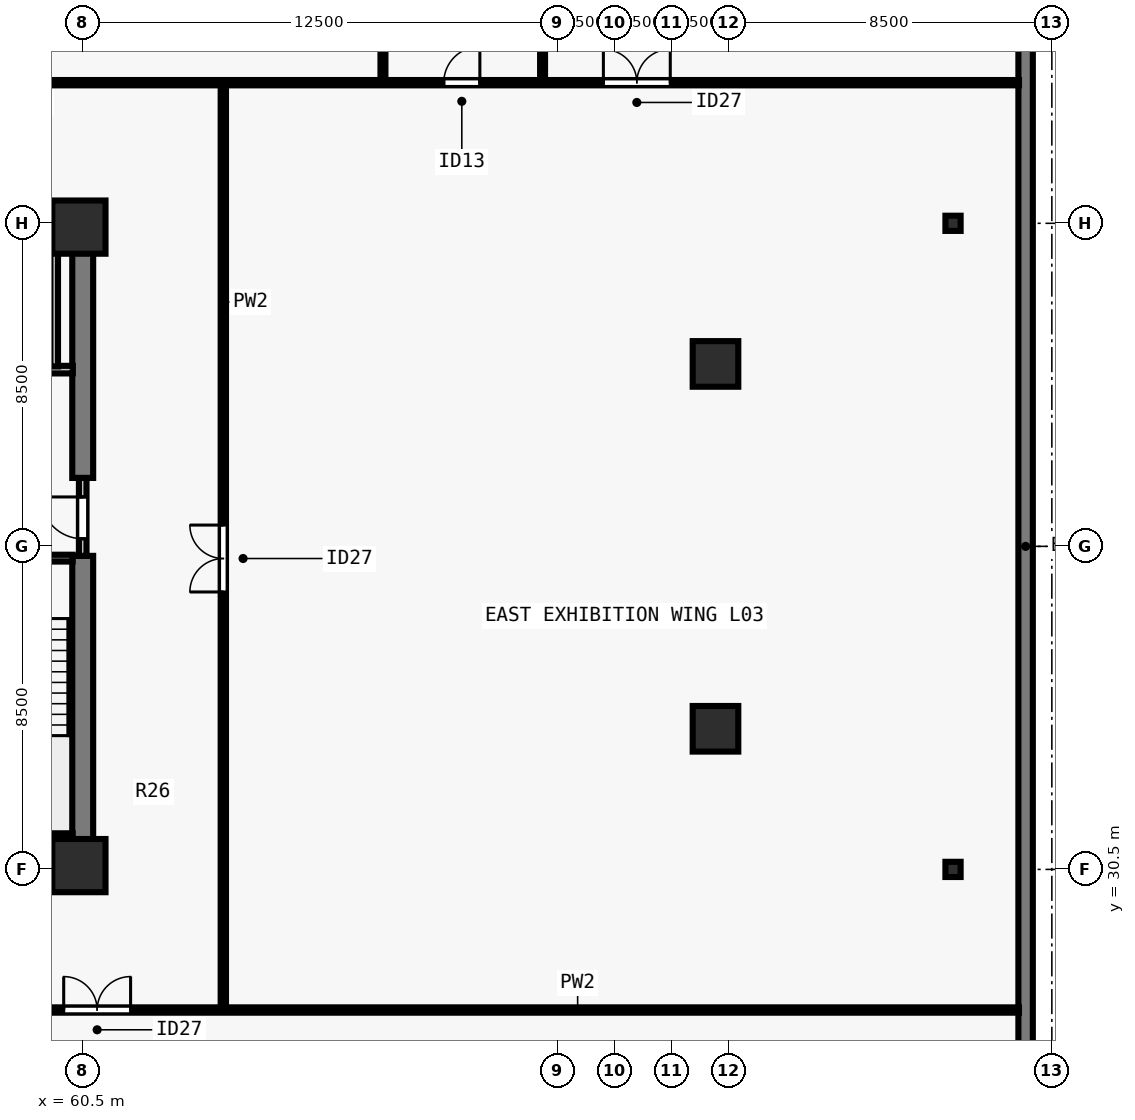
"""IFC4 building model, lengths in metres.
Left out: names, types, materials, properties, quantities, classifications, styles, units other than length and angle.
Written with IfcOpenShell. Run it as: python <this file> out.ifc"""

import sys

from ifc_helpers import new_model, si_unit, direction, frame, frame_2d, origin, origin_2d, place, context, subcontext, project, spatial, rectangle, i_section, extrude, element, fill, save


model = new_model("IFC4")
c1 = context("Model", 3, precision=1e-05, world=origin(), true_north=direction((0.0, 1.0)))
c2 = subcontext(c1, "Body", "Model", "MODEL_VIEW")
j1 = project(units=[si_unit("LENGTHUNIT", "METRE"), si_unit("PLANEANGLEUNIT", "RADIAN")], contexts=[c1])
p1 = place(None, origin())
s1 = spatial("IfcSite", under=j1, at=p1, CompositionType="ELEMENT")
p2 = place(p1, origin())
s2 = spatial("IfcBuilding", under=s1, at=p2, CompositionType="ELEMENT")
p3 = place(p2, frame((0.0, 0.0, 14.5)))
s3 = spatial("IfcBuildingStorey", under=s2, at=p3, CompositionType="ELEMENT", Elevation=14.5)
for number, where, z_axis, x_axis in (
    (1, (60.4, 30.6, 0.0), (0.0, 0.0, 1.0), (1.0, 0.0, 0.0)),
    (2, (60.4, 47.4, 0.0), (0.0, 0.0, 1.0), (1.0, 0.0, 0.0)),
):
    element("IfcColumn", number, at=place(p3, frame(where, z_axis=z_axis, x_axis=x_axis)), inside=s3, PredefinedType="COLUMN", context=c2, shape_type="SweptSolid", body=[
        extrude(rectangle(XDim=1.4, YDim=1.4, at=origin_2d()), origin(), (0.0, 0.0, 1.0), 4.5),
    ])
for number, where, z_axis, x_axis in (
    (3, (77.15, 34.2, 0.0), (0.0, 0.0, 1.0), (1.0, 0.0, 0.0)),
    (4, (77.15, 43.8, 0.0), (0.0, 0.0, 1.0), (1.0, 0.0, 0.0)),
):
    element("IfcColumn", number, at=place(p3, frame(where, z_axis=z_axis, x_axis=x_axis)), inside=s3, PredefinedType="COLUMN", context=c2, shape_type="SweptSolid", body=[
        extrude(rectangle(XDim=1.2, YDim=1.2, at=origin_2d()), origin(), (0.0, 0.0, 1.0), 4.5),
    ])
for number, where, z_axis, x_axis in (
    (5, (83.4, 30.5, 0.0), (0.0, 0.0, 1.0), (1.0, 0.0, 0.0)),
    (6, (83.4, 47.5, 0.0), (0.0, 0.0, 1.0), (1.0, 0.0, 0.0)),
):
    element("IfcColumn", number, at=place(p3, frame(where, z_axis=z_axis, x_axis=x_axis)), inside=s3, PredefinedType="COLUMN", context=c2, shape_type="SweptSolid", body=[
        extrude(i_section(OverallWidth=0.4, OverallDepth=0.4, WebThickness=0.028, FlangeThickness=0.045, at=origin_2d()), origin(), (0.0, 0.0, 1.0), 4.5),
    ])
p4 = place(p3, frame((85.31, 65.635, 0.0), z_axis=(0.0, 0.0, 1.0), x_axis=(0.0, -1.0, 0.0)))
e7 = element("IfcWall", 7, at=p4, inside=s3, PredefinedType="SOLIDWALL", context=c2, shape_type="SweptSolid", body=[
    extrude(rectangle(XDim=53.27, YDim=0.38, at=frame_2d((26.635, 0.0))), origin(), (0.0, 0.0, 1.0), 4.15),
])
for number, where, z_axis, x_axis in (
    (8, (43.225, 30.5, 0.0), (0.0, 0.0, 1.0), (1.0, 0.0, 0.0)),
    (9, (43.225, 47.5, 0.0), (0.0, 0.0, 1.0), (1.0, 0.0, 0.0)),
):
    element("IfcWall", number, at=place(p3, frame(where, z_axis=z_axis, x_axis=x_axis)), inside=s3, PredefinedType="SHEAR", context=c2, shape_type="SweptSolid", body=[
        extrude(rectangle(XDim=17.55, YDim=0.55, at=frame_2d((8.775, 0.0))), origin(), (0.0, 0.0, 1.0), 4.15),
    ])
p5 = place(p3, frame((60.5, 30.765, 0.0), z_axis=(0.0, 0.0, 1.0), x_axis=(0.0, 1.0, 0.0)))
e10 = element("IfcWall", 10, at=p5, inside=s3, PredefinedType="SHEAR", context=c2, shape_type="SweptSolid", body=[
    extrude(rectangle(XDim=7.985, YDim=0.55, at=frame_2d((3.993, 0.0))), origin(), (0.0, 0.0, 1.0), 4.15),
])
p6 = place(p3, frame((60.5, 40.8, 0.0), z_axis=(0.0, 0.0, 1.0), x_axis=(0.0, 1.0, 0.0)))
e11 = element("IfcWall", 11, at=p6, inside=s3, PredefinedType="SHEAR", context=c2, shape_type="SweptSolid", body=[
    extrude(rectangle(XDim=6.435, YDim=0.55, at=frame_2d((3.218, 0.0))), origin(), (0.0, 0.0, 1.0), 4.15),
])
p7 = place(p3, frame((60.5, 38.75, 0.0), z_axis=(0.0, 0.0, 1.0), x_axis=(0.0, 1.0, 0.0)))
e12 = element("IfcWall", 12, at=p7, inside=s3, PredefinedType="SOLIDWALL", context=c2, shape_type="SweptSolid", body=[
    extrude(rectangle(XDim=2.05, YDim=0.2, at=frame_2d((1.025, 0.0))), origin(), (0.0, 0.0, 1.0), 4.15),
])
p8 = place(p7, frame((0.45, 0.0, 0.0)))
e13 = element("IfcOpeningElement", 13, at=p8, cuts=e12, PredefinedType="OPENING", context=c2, shape_type="SweptSolid", body=[
    extrude(rectangle(XDim=1.1, YDim=2.15, at=frame_2d((0.55, 1.075))), frame((0.0, 0.11, 0.0), z_axis=(0.0, -1.0, 0.0), x_axis=(1.0, 0.0, 0.0)), (0.0, 0.0, 1.0), 0.22),
])
p9 = place(p3, frame((56.735, 43.65, 0.0), z_axis=(0.0, 0.0, 1.0), x_axis=(1.0, 0.0, 0.0)))
e14 = element("IfcWall", 14, at=p9, inside=s3, PredefinedType="SOLIDWALL", context=c2, shape_type="SweptSolid", body=[
    extrude(rectangle(XDim=3.505, YDim=0.2, at=frame_2d((1.752, 0.0))), origin(), (0.0, 0.0, 1.0), 4.15),
])
p10 = place(p9, frame((1.295, 0.0, 0.0)))
e15 = element("IfcOpeningElement", 15, at=p10, cuts=e14, PredefinedType="OPENING", context=c2, shape_type="SweptSolid", body=[
    extrude(rectangle(XDim=1.1, YDim=2.2, at=frame_2d((0.55, 1.1))), frame((0.0, 0.11, 0.0), z_axis=(0.0, -1.0, 0.0), x_axis=(1.0, 0.0, 0.0)), (0.0, 0.0, 1.0), 0.22),
])
p11 = place(p3, frame((59.75, 43.735, 0.0), z_axis=(0.0, 0.0, 1.0), x_axis=(0.0, 1.0, 0.0)))
e16 = element("IfcWall", 16, at=p11, inside=s3, PredefinedType="SOLIDWALL", context=c2, shape_type="SweptSolid", body=[
    extrude(rectangle(XDim=3.505, YDim=0.2, at=frame_2d((1.752, 0.0))), origin(), (0.0, 0.0, 1.0), 4.15),
])
p12 = place(p3, frame((18.865, 26.8, 0.0), z_axis=(0.0, 0.0, 1.0), x_axis=(1.0, 0.0, 0.0)))
e17 = element("IfcWall", 17, at=p12, inside=s3, PredefinedType="PARTITIONING", context=c2, shape_type="SweptSolid", body=[
    extrude(rectangle(XDim=66.27, YDim=0.14, at=frame_2d((33.135, 0.0))), origin(), (0.0, 0.0, 1.0), 3.668),
])
p13 = place(p12, frame((18.915, 0.0, 0.0)))
e18 = element("IfcOpeningElement", 18, at=p13, cuts=e17, PredefinedType="OPENING", context=c2, shape_type="SweptSolid", body=[
    extrude(rectangle(XDim=1.76, YDim=2.2, at=frame_2d((0.88, 1.1))), frame((0.0, 0.08, 0.0), z_axis=(0.0, -1.0, 0.0), x_axis=(1.0, 0.0, 0.0)), (0.0, 0.0, 1.0), 0.16),
])
p14 = place(p12, frame((41.135, 0.0, 0.0)))
e19 = element("IfcOpeningElement", 19, at=p14, cuts=e17, PredefinedType="OPENING", context=c2, shape_type="SweptSolid", body=[
    extrude(rectangle(XDim=1.76, YDim=2.2, at=frame_2d((0.88, 1.1))), frame((0.0, 0.08, 0.0), z_axis=(0.0, -1.0, 0.0), x_axis=(1.0, 0.0, 0.0)), (0.0, 0.0, 1.0), 0.16),
])
p15 = place(p3, frame((18.865, 51.2, 0.0), z_axis=(0.0, 0.0, 1.0), x_axis=(1.0, 0.0, 0.0)))
e20 = element("IfcWall", 20, at=p15, inside=s3, PredefinedType="PARTITIONING", context=c2, shape_type="SweptSolid", body=[
    extrude(rectangle(XDim=66.27, YDim=0.14, at=frame_2d((33.135, 0.0))), origin(), (0.0, 0.0, 1.0), 3.668),
])
p16 = place(p15, frame((24.335, 0.0, 0.0)))
e21 = element("IfcOpeningElement", 21, at=p16, cuts=e20, PredefinedType="OPENING", context=c2, shape_type="SweptSolid", body=[
    extrude(rectangle(XDim=1.76, YDim=2.2, at=frame_2d((0.88, 1.1))), frame((0.0, 0.08, 0.0), z_axis=(0.0, -1.0, 0.0), x_axis=(1.0, 0.0, 0.0)), (0.0, 0.0, 1.0), 0.16),
])
p17 = place(p15, frame((37.135, 0.0, 0.0)))
e22 = element("IfcOpeningElement", 22, at=p17, cuts=e20, PredefinedType="OPENING", context=c2, shape_type="SweptSolid", body=[
    extrude(rectangle(XDim=1.76, YDim=2.2, at=frame_2d((0.88, 1.1))), frame((0.0, 0.08, 0.0), z_axis=(0.0, -1.0, 0.0), x_axis=(1.0, 0.0, 0.0)), (0.0, 0.0, 1.0), 0.16),
])
p18 = place(p15, frame((51.135, 0.0, 0.0)))
e23 = element("IfcOpeningElement", 23, at=p18, cuts=e20, PredefinedType="OPENING", context=c2, shape_type="SweptSolid", body=[
    extrude(rectangle(XDim=0.95, YDim=2.1, at=frame_2d((0.475, 1.05))), frame((0.0, 0.08, 0.0), z_axis=(0.0, -1.0, 0.0), x_axis=(1.0, 0.0, 0.0)), (0.0, 0.0, 1.0), 0.16),
])
p19 = place(p15, frame((55.335, 0.0, 0.0)))
e24 = element("IfcOpeningElement", 24, at=p19, cuts=e20, PredefinedType="OPENING", context=c2, shape_type="SweptSolid", body=[
    extrude(rectangle(XDim=1.76, YDim=2.2, at=frame_2d((0.88, 1.1))), frame((0.0, 0.08, 0.0), z_axis=(0.0, -1.0, 0.0), x_axis=(1.0, 0.0, 0.0)), (0.0, 0.0, 1.0), 0.16),
])
p20 = place(p3, frame((64.2, 26.855, 0.0), z_axis=(0.0, 0.0, 1.0), x_axis=(0.0, 1.0, 0.0)))
e25 = element("IfcWall", 25, at=p20, inside=s3, PredefinedType="PARTITIONING", context=c2, shape_type="SweptSolid", body=[
    extrude(rectangle(XDim=24.29, YDim=0.14, at=frame_2d((12.145, 0.0))), origin(), (0.0, 0.0, 1.0), 4.15),
])
p21 = place(p20, frame((10.945, 0.0, 0.0)))
e26 = element("IfcOpeningElement", 26, at=p21, cuts=e25, PredefinedType="OPENING", context=c2, shape_type="SweptSolid", body=[
    extrude(rectangle(XDim=1.76, YDim=2.2, at=frame_2d((0.88, 1.1))), frame((0.0, 0.08, 0.0), z_axis=(0.0, -1.0, 0.0), x_axis=(1.0, 0.0, 0.0)), (0.0, 0.0, 1.0), 0.16),
])
p22 = place(p3, frame((68.4, 51.3, 0.0), z_axis=(0.0, 0.0, 1.0), x_axis=(0.0, 1.0, 0.0)))
e27 = element("IfcWall", 27, at=p22, inside=s3, PredefinedType="PLUMBINGWALL", context=c2, shape_type="SweptSolid", body=[
    extrude(rectangle(XDim=14.335, YDim=0.13, at=frame_2d((7.167, 0.0))), origin(), (0.0, 0.0, 1.0), 3.201),
])
p23 = place(p3, frame((72.6, 51.3, 0.0), z_axis=(0.0, 0.0, 1.0), x_axis=(0.0, 1.0, 0.0)))
e28 = element("IfcWall", 28, at=p23, inside=s3, PredefinedType="PLUMBINGWALL", context=c2, shape_type="SweptSolid", body=[
    extrude(rectangle(XDim=5.1, YDim=0.13, at=frame_2d((2.55, 0.0))), origin(), (0.0, 0.0, 1.0), 4.15),
])
p24 = place(p3, frame((57.005, 38.69, 0.0), z_axis=(0.0, 0.0, 1.0), x_axis=(1.0, 0.0, 0.0)))
e29 = element("IfcWall", 29, at=p24, inside=s3, PredefinedType="SOLIDWALL", context=c2, shape_type="SweptSolid", body=[
    extrude(rectangle(XDim=3.23, YDim=0.18, at=frame_2d((1.615, 0.0))), origin(), (0.0, 0.0, 1.0), 4.15),
])
p25 = place(p24, frame((1.14, 0.0, 0.0)))
e30 = element("IfcOpeningElement", 30, at=p25, cuts=e29, PredefinedType="OPENING", context=c2, shape_type="SweptSolid", body=[
    extrude(rectangle(XDim=0.95, YDim=2.15, at=frame_2d((0.475, 1.075))), frame((0.0, 0.1, 0.0), z_axis=(0.0, -1.0, 0.0), x_axis=(1.0, 0.0, 0.0)), (0.0, 0.0, 1.0), 0.2),
])
p26 = place(p3, frame((57.005, 31.36, 0.0), z_axis=(0.0, 0.0, 1.0), x_axis=(1.0, 0.0, 0.0)))
e31 = element("IfcWall", 31, at=p26, inside=s3, PredefinedType="SOLIDWALL", context=c2, shape_type="SweptSolid", body=[
    extrude(rectangle(XDim=3.23, YDim=0.18, at=frame_2d((1.615, 0.0))), origin(), (0.0, 0.0, 1.0), 4.15),
])
p27 = place(p8, origin())
e32 = element("IfcDoor", 32, at=p27, inside=s3, OperationType="SINGLE_SWING_RIGHT", PredefinedType="DOOR", context=c2, shape_type="SweptSolid", body=[
    extrude(rectangle(XDim=1.1, YDim=2.15, at=frame_2d((0.55, 1.075))), frame((0.0, 0.025, 0.0), z_axis=(0.0, -1.0, 0.0), x_axis=(1.0, 0.0, 0.0)), (0.0, 0.0, 1.0), 0.05),
])
fill(e13, e32)
p28 = place(p14, origin())
e33 = element("IfcDoor", 33, at=p28, inside=s3, OperationType="DOUBLE_DOOR_SINGLE_SWING", PredefinedType="DOOR", context=c2, shape_type="SweptSolid", body=[
    extrude(rectangle(XDim=1.76, YDim=2.2, at=frame_2d((0.88, 1.1))), frame((0.0, 0.025, 0.0), z_axis=(0.0, -1.0, 0.0), x_axis=(1.0, 0.0, 0.0)), (0.0, 0.0, 1.0), 0.05),
])
fill(e19, e33)
p29 = place(p18, origin())
e34 = element("IfcDoor", 34, at=p29, inside=s3, OperationType="SINGLE_SWING_RIGHT", PredefinedType="DOOR", context=c2, shape_type="SweptSolid", body=[
    extrude(rectangle(XDim=0.95, YDim=2.1, at=frame_2d((0.475, 1.05))), frame((0.0, 0.025, 0.0), z_axis=(0.0, -1.0, 0.0), x_axis=(1.0, 0.0, 0.0)), (0.0, 0.0, 1.0), 0.05),
])
fill(e23, e34)
p30 = place(p19, origin())
e35 = element("IfcDoor", 35, at=p30, inside=s3, OperationType="DOUBLE_DOOR_SINGLE_SWING", PredefinedType="DOOR", context=c2, shape_type="SweptSolid", body=[
    extrude(rectangle(XDim=1.76, YDim=2.2, at=frame_2d((0.88, 1.1))), frame((0.0, 0.025, 0.0), z_axis=(0.0, -1.0, 0.0), x_axis=(1.0, 0.0, 0.0)), (0.0, 0.0, 1.0), 0.05),
])
fill(e24, e35)
p31 = place(p21, origin())
e36 = element("IfcDoor", 36, at=p31, inside=s3, OperationType="DOUBLE_DOOR_SINGLE_SWING", PredefinedType="DOOR", context=c2, shape_type="SweptSolid", body=[
    extrude(rectangle(XDim=1.76, YDim=2.2, at=frame_2d((0.88, 1.1))), frame((0.0, 0.025, 0.0), z_axis=(0.0, -1.0, 0.0), x_axis=(1.0, 0.0, 0.0)), (0.0, 0.0, 1.0), 0.05),
])
fill(e26, e36)
save(model, sys.argv[1])
